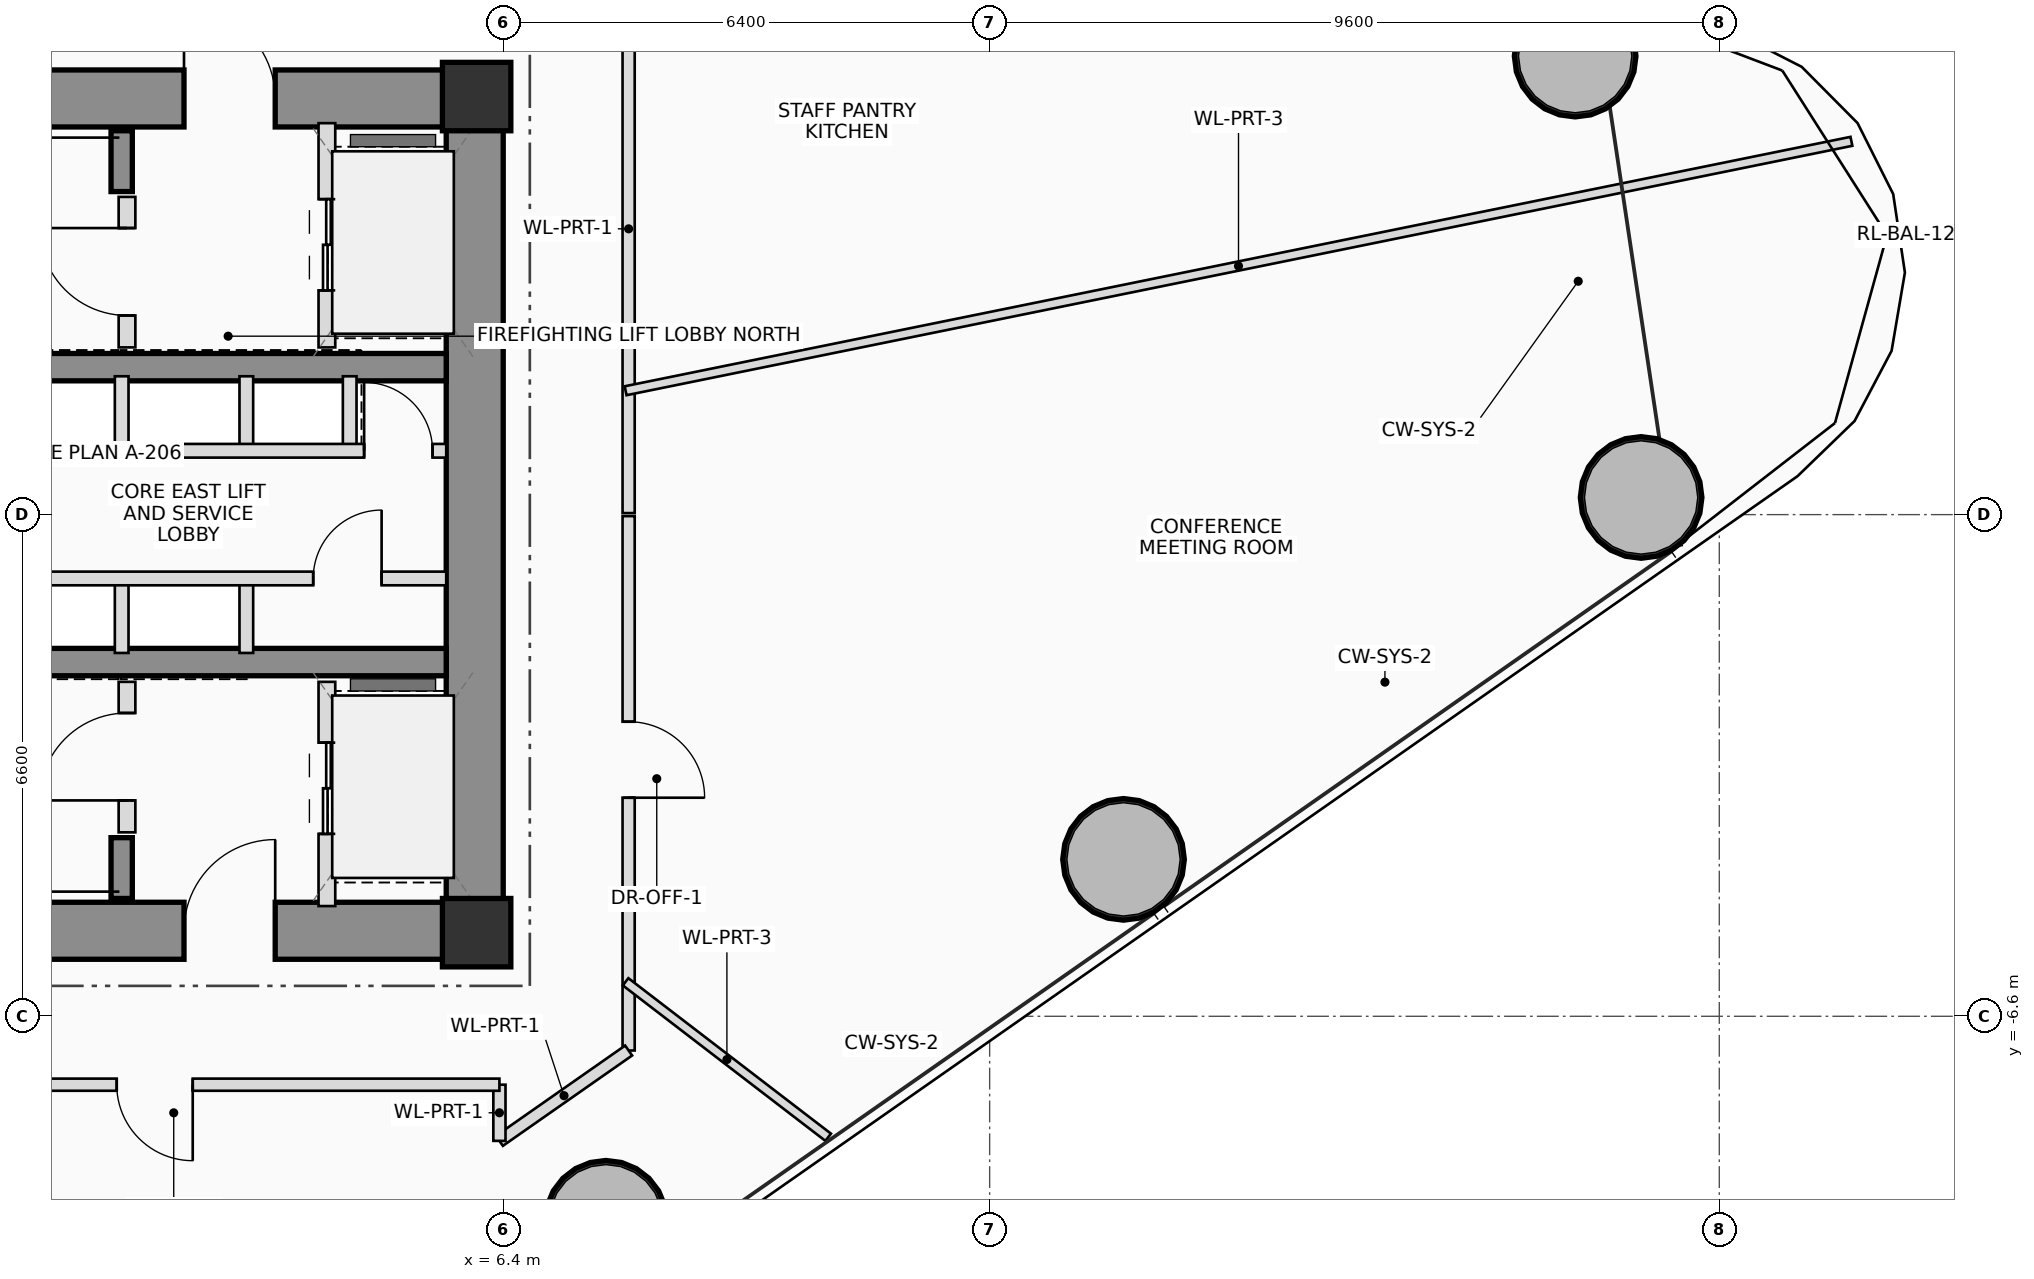
"""IFC4 building model, lengths in metres.
Left out: names, types, materials, properties, quantities, classifications, styles, units other than length and angle.
Written with IfcOpenShell. Run it as: python <this file> out.ifc"""

import sys

from ifc_helpers import new_model, si_unit, direction, frame, frame_2d, origin, origin_2d, place, context, subcontext, project, spatial, rectangle, hollow_circle, extrude, source, transform, mapped, element, fill, save


model = new_model("IFC4")
c1 = context("Model", 3, precision=1e-05, world=origin(), true_north=direction((0.0, 1.0)))
c2 = subcontext(c1, "Body", "Model", "MODEL_VIEW")
j1 = project(units=[si_unit("LENGTHUNIT", "METRE"), si_unit("PLANEANGLEUNIT", "RADIAN")], contexts=[c1])
p1 = place(None, origin())
s1 = spatial("IfcSite", under=j1, at=p1, CompositionType="ELEMENT")
p2 = place(p1, origin())
s2 = spatial("IfcBuilding", under=s1, at=p2, CompositionType="ELEMENT")
p3 = place(p2, frame((0.0, 0.0, 54.8)))
s3 = spatial("IfcBuildingStorey", under=s2, at=p3, CompositionType="ELEMENT", Elevation=54.8)
m1 = source(origin(), c2, "Body", "SweptSolid", [
    extrude(rectangle(XDim=0.9, YDim=0.9, at=origin_2d()), origin(), (0.0, 0.0, 1.0), 3.75),
])
for number, where, z_axis, x_axis in (
    (1, (6.05, -5.5, 0.0), (0.0, 0.0, 1.0), (1.0, 0.0, 0.0)),
    (2, (6.05, 5.5, 0.0), (0.0, 0.0, 1.0), (1.0, 0.0, 0.0)),
):
    element("IfcColumn", number, at=place(p3, frame(where, z_axis=z_axis, x_axis=x_axis)), inside=s3, PredefinedType="COLUMN", context=c2, shape_type="MappedRepresentation", body=[
        mapped(m1, transform((0.0, 0.0, 0.0), scale=1.0)),
    ])
p4 = place(p3, frame((-6.4, 5.475, 0.0), z_axis=(0.0, 0.0, 1.0), x_axis=(1.0, 0.0, 0.0)))
e3 = element("IfcWall", 3, at=p4, inside=s3, PredefinedType="SHEAR", context=c2, shape_type="SweptSolid", body=[
    extrude(rectangle(XDim=12.8, YDim=0.75, at=frame_2d((6.4, 0.0))), origin(), (0.0, 0.0, 1.0), 3.75),
])
p5 = place(p4, frame((8.6, 0.0, 0.0)))
e4 = element("IfcOpeningElement", 4, at=p5, cuts=e3, PredefinedType="OPENING", context=c2, shape_type="SweptSolid", body=[
    extrude(rectangle(XDim=1.2, YDim=2.2, at=frame_2d((0.6, 1.1))), frame((0.0, 0.385, 0.0), z_axis=(0.0, -1.0, 0.0), x_axis=(1.0, 0.0, 0.0)), (0.0, 0.0, 1.0), 0.77),
])
p6 = place(p3, frame((-6.4, -5.475, 0.0), z_axis=(0.0, 0.0, 1.0), x_axis=(1.0, 0.0, 0.0)))
e5 = element("IfcWall", 5, at=p6, inside=s3, PredefinedType="SHEAR", context=c2, shape_type="SweptSolid", body=[
    extrude(rectangle(XDim=12.8, YDim=0.75, at=frame_2d((6.4, 0.0))), origin(), (0.0, 0.0, 1.0), 3.75),
])
p7 = place(p6, frame((8.6, 0.0, 0.0)))
e6 = element("IfcOpeningElement", 6, at=p7, cuts=e5, PredefinedType="OPENING", context=c2, shape_type="SweptSolid", body=[
    extrude(rectangle(XDim=1.2, YDim=2.2, at=frame_2d((0.6, 1.1))), frame((0.0, 0.385, 0.0), z_axis=(0.0, -1.0, 0.0), x_axis=(1.0, 0.0, 0.0)), (0.0, 0.0, 1.0), 0.77),
])
p8 = place(p3, frame((6.025, -5.1, 0.0), z_axis=(0.0, 0.0, 1.0), x_axis=(0.0, 1.0, 0.0)))
e7 = element("IfcWall", 7, at=p8, inside=s3, PredefinedType="SHEAR", context=c2, shape_type="SweptSolid", body=[
    extrude(rectangle(XDim=10.2, YDim=0.75, at=frame_2d((5.1, 0.0))), origin(), (0.0, 0.0, 1.0), 3.75),
])
for number, where, z_axis, x_axis in (
    (8, (-5.65, 1.94, 0.0), (0.0, 0.0, 1.0), (1.0, 0.0, 0.0)),
    (9, (-5.65, -1.94, 0.0), (0.0, 0.0, 1.0), (1.0, 0.0, 0.0)),
):
    element("IfcWall", number, at=place(p3, frame(where, z_axis=z_axis, x_axis=x_axis)), inside=s3, PredefinedType="SHEAR", context=c2, shape_type="SweptSolid", body=[
        extrude(rectangle(XDim=11.3, YDim=0.36, at=frame_2d((5.65, 0.0))), origin(), (0.0, 0.0, 1.0), 3.75),
    ])
for number, where, z_axis, x_axis in (
    (10, (1.38, 4.25, 0.0), (0.0, 0.0, 1.0), (0.0, 1.0, 0.0)),
    (11, (1.38, -5.05, 0.0), (0.0, 0.0, 1.0), (0.0, 1.0, 0.0)),
):
    element("IfcWall", number, at=place(p3, frame(where, z_axis=z_axis, x_axis=x_axis)), inside=s3, PredefinedType="SHEAR", context=c2, shape_type="SweptSolid", body=[
        extrude(rectangle(XDim=0.8, YDim=0.28, at=frame_2d((0.4, 0.0))), origin(), (0.0, 0.0, 1.0), 3.75),
    ])
m2 = source(origin(), c2, "Body", "SweptSolid", [
    extrude(hollow_circle(Radius=0.8, WallThickness=0.055, at=origin_2d()), origin(), (0.0, 0.0, 1.0), 3.75),
])
for number, where, z_axis, x_axis in (
    (12, (7.752, -9.297, 0.0), (0.0, 0.0, 1.0), (1.0, 0.0, 0.0)),
    (13, (14.562, -4.535, 0.0), (0.0, 0.0, 1.0), (1.0, 0.0, 0.0)),
    (14, (21.371, 0.226, 0.0), (0.0, 0.0, 1.0), (1.0, 0.0, 0.0)),
    (15, (20.503, 6.032, 0.0), (0.0, 0.0, 1.0), (1.0, 0.0, 0.0)),
):
    element("IfcColumn", number, at=place(p3, frame(where, z_axis=z_axis, x_axis=x_axis)), inside=s3, PredefinedType="COLUMN", context=c2, shape_type="MappedRepresentation", body=[
        mapped(m2, transform((0.0, 0.0, 0.0), scale=1.0)),
    ])
p9 = place(p3, frame((1.45, 2.2, 0.0), z_axis=(0.0, 0.0, 1.0), x_axis=(0.0, 1.0, 0.0)))
e16 = element("IfcWall", 16, at=p9, inside=s3, PredefinedType="PLUMBINGWALL", context=c2, shape_type="SweptSolid", body=[
    extrude(rectangle(XDim=1.98, YDim=0.22, at=frame_2d((0.99, 0.0))), origin(), (0.0, 0.0, 1.0), 3.545),
])
p10 = place(p9, frame((0.42, 0.0, 0.0)))
e17 = element("IfcOpeningElement", 17, at=p10, cuts=e16, PredefinedType="OPENING", context=c2, shape_type="SweptSolid", body=[
    extrude(rectangle(XDim=1.15, YDim=2.15, at=frame_2d((0.575, 1.075))), frame((0.0, 0.12, 0.0), z_axis=(0.0, -1.0, 0.0), x_axis=(1.0, 0.0, 0.0)), (0.0, 0.0, 1.0), 0.24),
])
p11 = place(p3, frame((4.08, 2.2, 0.0), z_axis=(0.0, 0.0, 1.0), x_axis=(0.0, 1.0, 0.0)))
e18 = element("IfcWall", 18, at=p11, inside=s3, PredefinedType="PLUMBINGWALL", context=c2, shape_type="SweptSolid", body=[
    extrude(rectangle(XDim=2.95, YDim=0.22, at=frame_2d((1.475, 0.0))), origin(), (0.0, 0.0, 1.0), 3.545),
])
p12 = place(p11, frame((0.75, 0.0, 0.0)))
e19 = element("IfcOpeningElement", 19, at=p12, cuts=e18, PredefinedType="OPENING", context=c2, shape_type="SweptSolid", body=[
    extrude(rectangle(XDim=1.2, YDim=2.25, at=frame_2d((0.6, 1.125))), frame((0.0, 0.12, 0.0), z_axis=(0.0, -1.0, 0.0), x_axis=(1.0, 0.0, 0.0)), (0.0, 0.0, 1.0), 0.24),
])
p13 = place(p3, frame((1.45, -4.18, 0.0), z_axis=(0.0, 0.0, 1.0), x_axis=(0.0, 1.0, 0.0)))
e20 = element("IfcWall", 20, at=p13, inside=s3, PredefinedType="PLUMBINGWALL", context=c2, shape_type="SweptSolid", body=[
    extrude(rectangle(XDim=1.98, YDim=0.22, at=frame_2d((0.99, 0.0))), origin(), (0.0, 0.0, 1.0), 3.545),
])
p14 = place(p13, frame((0.42, 0.0, 0.0)))
e21 = element("IfcOpeningElement", 21, at=p14, cuts=e20, PredefinedType="OPENING", context=c2, shape_type="SweptSolid", body=[
    extrude(rectangle(XDim=1.15, YDim=2.15, at=frame_2d((0.575, 1.075))), frame((0.0, 0.12, 0.0), z_axis=(0.0, -1.0, 0.0), x_axis=(1.0, 0.0, 0.0)), (0.0, 0.0, 1.0), 0.24),
])
p15 = place(p3, frame((4.08, -5.15, 0.0), z_axis=(0.0, 0.0, 1.0), x_axis=(0.0, 1.0, 0.0)))
e22 = element("IfcWall", 22, at=p15, inside=s3, PredefinedType="PLUMBINGWALL", context=c2, shape_type="SweptSolid", body=[
    extrude(rectangle(XDim=2.95, YDim=0.22, at=frame_2d((1.475, 0.0))), origin(), (0.0, 0.0, 1.0), 3.545),
])
p16 = place(p15, frame((0.95, 0.0, 0.0)))
e23 = element("IfcOpeningElement", 23, at=p16, cuts=e22, PredefinedType="OPENING", context=c2, shape_type="SweptSolid", body=[
    extrude(rectangle(XDim=1.2, YDim=2.25, at=frame_2d((0.6, 1.125))), frame((0.0, 0.12, 0.0), z_axis=(0.0, -1.0, 0.0), x_axis=(1.0, 0.0, 0.0)), (0.0, 0.0, 1.0), 0.24),
])
for number, where, z_axis, x_axis in (
    (24, (1.38, 0.84, 0.0), (0.0, 0.0, 1.0), (0.0, 1.0, 0.0)),
    (25, (1.38, -1.82, 0.0), (0.0, 0.0, 1.0), (0.0, 1.0, 0.0)),
    (26, (3.02, 0.84, 0.0), (0.0, 0.0, 1.0), (0.0, 1.0, 0.0)),
    (27, (4.38, 0.84, 0.0), (0.0, 0.0, 1.0), (0.0, 1.0, 0.0)),
    (28, (3.02, -1.82, 0.0), (0.0, 0.0, 1.0), (0.0, 1.0, 0.0)),
):
    element("IfcWall", number, at=place(p3, frame(where, z_axis=z_axis, x_axis=x_axis)), inside=s3, PredefinedType="PLUMBINGWALL", context=c2, shape_type="SweptSolid", body=[
        extrude(rectangle(XDim=0.98, YDim=0.18, at=frame_2d((0.49, 0.0))), origin(), (0.0, 0.0, 1.0), 3.545),
    ])
p17 = place(p3, frame((-5.68, 0.84, 0.0), z_axis=(0.0, 0.0, 1.0), x_axis=(1.0, 0.0, 0.0)))
e29 = element("IfcWall", 29, at=p17, inside=s3, PredefinedType="PLUMBINGWALL", context=c2, shape_type="SweptSolid", body=[
    extrude(rectangle(XDim=11.33, YDim=0.18, at=frame_2d((5.665, 0.0))), origin(), (0.0, 0.0, 1.0), 3.545),
])
p18 = place(p17, frame((0.43, 0.0, 0.0)))
e30 = element("IfcOpeningElement", 30, at=p18, cuts=e29, PredefinedType="OPENING", context=c2, shape_type="SweptSolid", body=[
    extrude(rectangle(XDim=1.1, YDim=2.2, at=frame_2d((0.55, 1.1))), frame((0.0, 0.1, 0.0), z_axis=(0.0, -1.0, 0.0), x_axis=(1.0, 0.0, 0.0)), (0.0, 0.0, 1.0), 0.2),
])
p19 = place(p17, frame((2.13, 0.0, 0.0)))
e31 = element("IfcOpeningElement", 31, at=p19, cuts=e29, PredefinedType="OPENING", context=c2, shape_type="SweptSolid", body=[
    extrude(rectangle(XDim=1.1, YDim=2.2, at=frame_2d((0.55, 1.1))), frame((0.0, 0.1, 0.0), z_axis=(0.0, -1.0, 0.0), x_axis=(1.0, 0.0, 0.0)), (0.0, 0.0, 1.0), 0.2),
])
p20 = place(p17, frame((10.25, 0.0, 0.0)))
e32 = element("IfcOpeningElement", 32, at=p20, cuts=e29, PredefinedType="OPENING", context=c2, shape_type="SweptSolid", body=[
    extrude(rectangle(XDim=0.9, YDim=2.05, at=frame_2d((0.45, 1.025))), frame((0.0, 0.1, 0.0), z_axis=(0.0, -1.0, 0.0), x_axis=(1.0, 0.0, 0.0)), (0.0, 0.0, 1.0), 0.2),
])
p21 = place(p3, frame((-5.68, -0.84, 0.0), z_axis=(0.0, 0.0, 1.0), x_axis=(1.0, 0.0, 0.0)))
e33 = element("IfcWall", 33, at=p21, inside=s3, PredefinedType="PLUMBINGWALL", context=c2, shape_type="SweptSolid", body=[
    extrude(rectangle(XDim=11.33, YDim=0.18, at=frame_2d((5.665, 0.0))), origin(), (0.0, 0.0, 1.0), 3.545),
])
p22 = place(p21, frame((0.43, 0.0, 0.0)))
e34 = element("IfcOpeningElement", 34, at=p22, cuts=e33, PredefinedType="OPENING", context=c2, shape_type="SweptSolid", body=[
    extrude(rectangle(XDim=1.1, YDim=2.2, at=frame_2d((0.55, 1.1))), frame((0.0, 0.1, 0.0), z_axis=(0.0, -1.0, 0.0), x_axis=(1.0, 0.0, 0.0)), (0.0, 0.0, 1.0), 0.2),
])
p23 = place(p21, frame((2.13, 0.0, 0.0)))
e35 = element("IfcOpeningElement", 35, at=p23, cuts=e33, PredefinedType="OPENING", context=c2, shape_type="SweptSolid", body=[
    extrude(rectangle(XDim=1.1, YDim=2.2, at=frame_2d((0.55, 1.1))), frame((0.0, 0.1, 0.0), z_axis=(0.0, -1.0, 0.0), x_axis=(1.0, 0.0, 0.0)), (0.0, 0.0, 1.0), 0.2),
])
p24 = place(p21, frame((9.58, 0.0, 0.0)))
e36 = element("IfcOpeningElement", 36, at=p24, cuts=e33, PredefinedType="OPENING", context=c2, shape_type="SweptSolid", body=[
    extrude(rectangle(XDim=0.9, YDim=2.05, at=frame_2d((0.45, 1.025))), frame((0.0, 0.1, 0.0), z_axis=(0.0, -1.0, 0.0), x_axis=(1.0, 0.0, 0.0)), (0.0, 0.0, 1.0), 0.2),
])
p25 = place(p3, frame((8.05, 7.5, 0.0), z_axis=(0.0, 0.0, 1.0), x_axis=(0.0, -1.0, 0.0)))
e37 = element("IfcWall", 37, at=p25, inside=s3, PredefinedType="PARTITIONING", context=c2, shape_type="SweptSolid", body=[
    extrude(rectangle(XDim=7.48, YDim=0.16, at=frame_2d((3.74, 0.0))), origin(), (0.0, 0.0, 1.0), 2.85),
])
p26 = place(p3, frame((8.05, -0.02, 0.0), z_axis=(0.0, 0.0, 1.0), x_axis=(0.0, -1.0, 0.0)))
e38 = element("IfcWall", 38, at=p26, inside=s3, PredefinedType="PARTITIONING", context=c2, shape_type="SweptSolid", body=[
    extrude(rectangle(XDim=7.03, YDim=0.16, at=frame_2d((3.515, 0.0))), origin(), (0.0, 0.0, 1.0), 2.85),
])
p27 = place(p26, frame((2.705, 0.0, 0.0)))
e39 = element("IfcOpeningElement", 39, at=p27, cuts=e38, PredefinedType="OPENING", context=c2, shape_type="SweptSolid", body=[
    extrude(rectangle(XDim=1.0, YDim=2.25, at=frame_2d((0.5, 1.125))), frame((0.0, 0.09, 0.0), z_axis=(0.0, -1.0, 0.0), x_axis=(1.0, 0.0, 0.0)), (0.0, 0.0, 1.0), 0.18),
])
p28 = place(p3, frame((8.05, -7.05, 0.0), z_axis=(0.0, 0.0, 1.0), x_axis=(-0.819513816746, -0.573059424635, 0.0)))
e40 = element("IfcWall", 40, at=p28, inside=s3, PredefinedType="PARTITIONING", context=c2, shape_type="SweptSolid", body=[
    extrude(rectangle(XDim=2.074, YDim=0.16, at=frame_2d((1.037, 0.0))), origin(), (0.0, 0.0, 1.0), 2.85),
])
p29 = place(p3, frame((6.35, -8.239, 0.0), z_axis=(0.0, 0.0, 1.0), x_axis=(0.0, 1.0, 0.0)))
e41 = element("IfcWall", 41, at=p29, inside=s3, PredefinedType="PARTITIONING", context=c2, shape_type="SweptSolid", body=[
    extrude(rectangle(XDim=0.739, YDim=0.16, at=frame_2d((0.37, 0.0))), origin(), (0.0, 0.0, 1.0), 3.545),
])
p30 = place(p3, frame((6.35, -7.5, 0.0), z_axis=(0.0, 0.0, 1.0), x_axis=(-1.0, 0.0, 0.0)))
e42 = element("IfcWall", 42, at=p30, inside=s3, PredefinedType="PARTITIONING", context=c2, shape_type="SweptSolid", body=[
    extrude(rectangle(XDim=12.7, YDim=0.16, at=frame_2d((6.35, 0.0))), origin(), (0.0, 0.0, 1.0), 2.85),
])
p31 = place(p30, frame((4.035, 0.0, 0.0)))
e43 = element("IfcOpeningElement", 43, at=p31, cuts=e42, PredefinedType="OPENING", context=c2, shape_type="SweptSolid", body=[
    extrude(rectangle(XDim=1.0, YDim=2.25, at=frame_2d((0.5, 1.125))), frame((0.0, 0.09, 0.0), z_axis=(0.0, -1.0, 0.0), x_axis=(1.0, 0.0, 0.0)), (0.0, 0.0, 1.0), 0.18),
])
p32 = place(p3, frame((8.01, -6.146, 0.0), z_axis=(0.0, 0.0, 1.0), x_axis=(0.79333380799, -0.608786883153, 0.0)))
e44 = element("IfcWall", 44, at=p32, inside=s3, PredefinedType="PARTITIONING", context=c2, shape_type="SweptSolid", body=[
    extrude(rectangle(XDim=3.36, YDim=0.12, at=frame_2d((1.68, 0.0))), origin(), (0.0, 0.0, 1.0), 3.01),
])
p33 = place(p3, frame((8.01, 1.63, 0.0), z_axis=(0.0, 0.0, 1.0), x_axis=(0.979925464906, 0.199364197459, 0.0)))
e45 = element("IfcWall", 45, at=p33, inside=s3, PredefinedType="PARTITIONING", context=c2, shape_type="SweptSolid", body=[
    extrude(rectangle(XDim=16.458, YDim=0.12, at=frame_2d((8.229, 0.0))), origin(), (0.0, 0.0, 1.0), 3.01),
])
p34 = place(p5, origin())
e46 = element("IfcDoor", 46, at=p34, inside=s3, OperationType="SINGLE_SWING_LEFT", PredefinedType="DOOR", context=c2, shape_type="SweptSolid", body=[
    extrude(rectangle(XDim=1.2, YDim=2.2, at=frame_2d((0.6, 1.1))), frame((0.0, 0.025, 0.0), z_axis=(0.0, -1.0, 0.0), x_axis=(1.0, 0.0, 0.0)), (0.0, 0.0, 1.0), 0.05),
])
fill(e4, e46)
p35 = place(p7, origin())
e47 = element("IfcDoor", 47, at=p35, inside=s3, OperationType="SINGLE_SWING_RIGHT", PredefinedType="DOOR", context=c2, shape_type="SweptSolid", body=[
    extrude(rectangle(XDim=1.2, YDim=2.2, at=frame_2d((0.6, 1.1))), frame((0.0, 0.025, 0.0), z_axis=(0.0, -1.0, 0.0), x_axis=(1.0, 0.0, 0.0)), (0.0, 0.0, 1.0), 0.05),
])
fill(e6, e47)
p36 = place(p10, origin())
e48 = element("IfcDoor", 48, at=p36, inside=s3, OperationType="SINGLE_SWING_RIGHT", PredefinedType="DOOR", context=c2, shape_type="SweptSolid", body=[
    extrude(rectangle(XDim=1.15, YDim=2.15, at=frame_2d((0.575, 1.075))), frame((0.0, 0.025, 0.0), z_axis=(0.0, -1.0, 0.0), x_axis=(1.0, 0.0, 0.0)), (0.0, 0.0, 1.0), 0.05),
])
fill(e17, e48)
p37 = place(p12, origin())
e49 = element("IfcDoor", 49, at=p37, inside=s3, OperationType="DOUBLE_DOOR_SLIDING", PredefinedType="DOOR", context=c2, shape_type="SweptSolid", body=[
    extrude(rectangle(XDim=1.2, YDim=2.25, at=frame_2d((0.6, 1.125))), frame((0.0, 0.025, 0.0), z_axis=(0.0, -1.0, 0.0), x_axis=(1.0, 0.0, 0.0)), (0.0, 0.0, 1.0), 0.05),
])
fill(e19, e49)
p38 = place(p14, origin())
e50 = element("IfcDoor", 50, at=p38, inside=s3, OperationType="SINGLE_SWING_LEFT", PredefinedType="DOOR", context=c2, shape_type="SweptSolid", body=[
    extrude(rectangle(XDim=1.15, YDim=2.15, at=frame_2d((0.575, 1.075))), frame((0.0, 0.025, 0.0), z_axis=(0.0, -1.0, 0.0), x_axis=(1.0, 0.0, 0.0)), (0.0, 0.0, 1.0), 0.05),
])
fill(e21, e50)
p39 = place(p16, origin())
e51 = element("IfcDoor", 51, at=p39, inside=s3, OperationType="DOUBLE_DOOR_SLIDING", PredefinedType="DOOR", context=c2, shape_type="SweptSolid", body=[
    extrude(rectangle(XDim=1.2, YDim=2.25, at=frame_2d((0.6, 1.125))), frame((0.0, 0.025, 0.0), z_axis=(0.0, -1.0, 0.0), x_axis=(1.0, 0.0, 0.0)), (0.0, 0.0, 1.0), 0.05),
])
fill(e23, e51)
p40 = place(p20, origin())
e52 = element("IfcDoor", 52, at=p40, inside=s3, OperationType="SINGLE_SWING_LEFT", PredefinedType="DOOR", context=c2, shape_type="SweptSolid", body=[
    extrude(rectangle(XDim=0.9, YDim=2.05, at=frame_2d((0.45, 1.025))), frame((0.0, 0.025, 0.0), z_axis=(0.0, -1.0, 0.0), x_axis=(1.0, 0.0, 0.0)), (0.0, 0.0, 1.0), 0.05),
])
fill(e32, e52)
p41 = place(p24, origin())
e53 = element("IfcDoor", 53, at=p41, inside=s3, OperationType="SINGLE_SWING_RIGHT", PredefinedType="DOOR", context=c2, shape_type="SweptSolid", body=[
    extrude(rectangle(XDim=0.9, YDim=2.05, at=frame_2d((0.45, 1.025))), frame((0.0, 0.025, 0.0), z_axis=(0.0, -1.0, 0.0), x_axis=(1.0, 0.0, 0.0)), (0.0, 0.0, 1.0), 0.05),
])
fill(e36, e53)
p42 = place(p27, origin())
e54 = element("IfcDoor", 54, at=p42, inside=s3, OperationType="SINGLE_SWING_RIGHT", PredefinedType="DOOR", context=c2, shape_type="SweptSolid", body=[
    extrude(rectangle(XDim=1.0, YDim=2.25, at=frame_2d((0.5, 1.125))), frame((0.0, 0.025, 0.0), z_axis=(0.0, -1.0, 0.0), x_axis=(1.0, 0.0, 0.0)), (0.0, 0.0, 1.0), 0.05),
])
fill(e39, e54)
p43 = place(p31, origin())
e55 = element("IfcDoor", 55, at=p43, inside=s3, OperationType="SINGLE_SWING_LEFT", PredefinedType="DOOR", context=c2, shape_type="SweptSolid", body=[
    extrude(rectangle(XDim=1.0, YDim=2.25, at=frame_2d((0.5, 1.125))), frame((0.0, 0.025, 0.0), z_axis=(0.0, -1.0, 0.0), x_axis=(1.0, 0.0, 0.0)), (0.0, 0.0, 1.0), 0.05),
])
fill(e43, e55)
save(model, sys.argv[1])
